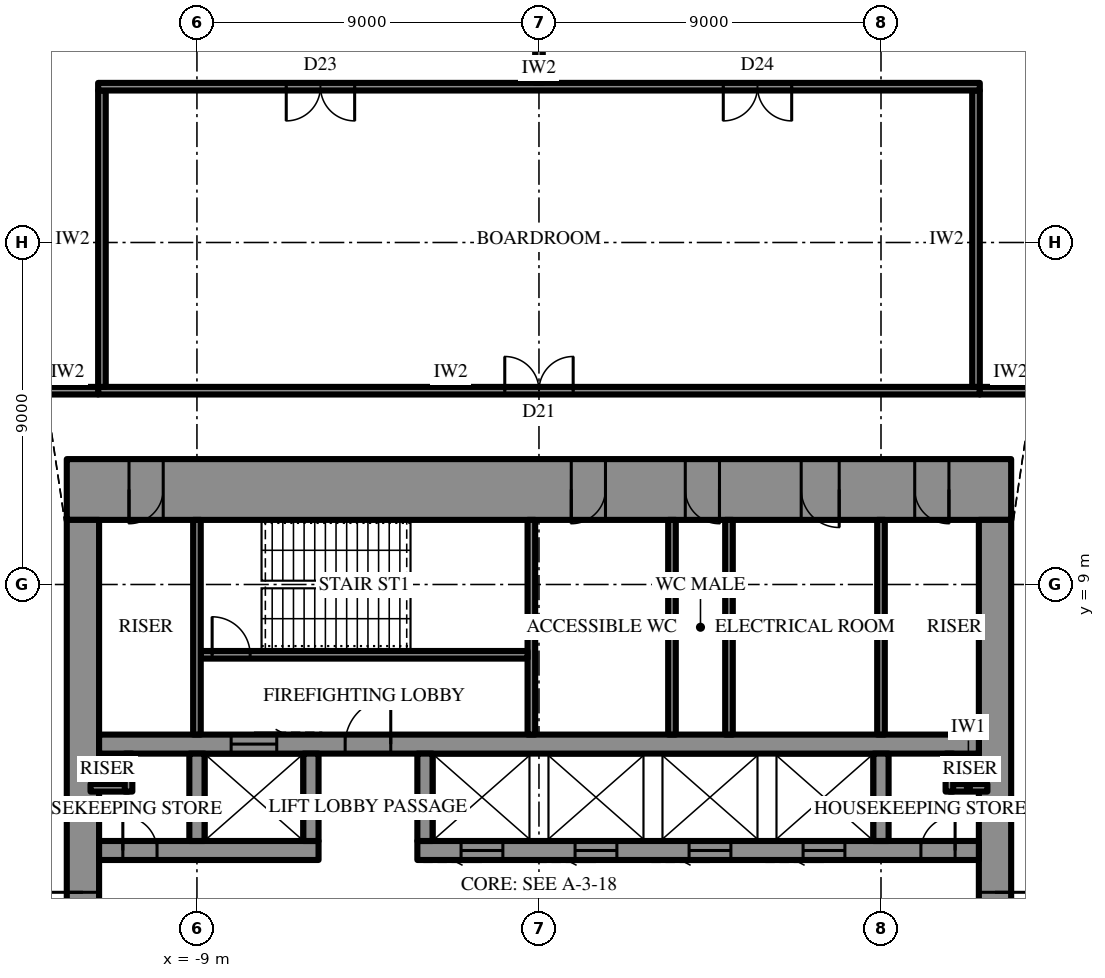
"""IFC4 building model, lengths in metres.
Left out: names, types, materials, properties, quantities, classifications, styles, units other than length and angle.
Written with IfcOpenShell. Run it as: python <this file> out.ifc"""

import sys

from ifc_helpers import new_model, si_unit, direction, frame, frame_2d, origin, place, context, subcontext, project, spatial, rectangle, extrude, element, fill, save


model = new_model("IFC4")
c1 = context("Model", 3, precision=1e-05, world=origin(), true_north=direction((0.0, 1.0)))
c2 = subcontext(c1, "Body", "Model", "MODEL_VIEW")
j1 = project(units=[si_unit("LENGTHUNIT", "METRE"), si_unit("PLANEANGLEUNIT", "RADIAN")], contexts=[c1])
p1 = place(None, origin())
s1 = spatial("IfcSite", under=j1, at=p1, CompositionType="ELEMENT")
p2 = place(p1, origin())
s2 = spatial("IfcBuilding", under=s1, at=p2, CompositionType="ELEMENT")
p3 = place(p2, frame((0.0, 0.0, 391.3)))
s3 = spatial("IfcBuildingStorey", under=s2, at=p3, CompositionType="ELEMENT", Elevation=391.3)
p4 = place(p3, frame((-12.425, 11.5, 0.0), z_axis=(0.0, 0.0, 1.0), x_axis=(1.0, 0.0, 0.0)))
e1 = element("IfcWall", 1, at=p4, inside=s3, PredefinedType="SHEAR", context=c2, shape_type="SweptSolid", body=[
    extrude(rectangle(XDim=24.85, YDim=1.6, at=frame_2d((12.425, 0.0))), origin(), (0.0, 0.0, 1.0), 5.0),
])
p5 = place(p4, frame((13.275, 0.0, 0.0)))
e2 = element("IfcOpeningElement", 2, at=p5, cuts=e1, PredefinedType="OPENING", context=c2, shape_type="SweptSolid", body=[
    extrude(rectangle(XDim=0.9, YDim=2.2, at=frame_2d((0.45, 1.1))), frame((0.0, 0.81, 0.0), z_axis=(0.0, -1.0, 0.0), x_axis=(1.0, 0.0, 0.0)), (0.0, 0.0, 1.0), 1.62),
])
p6 = place(p4, frame((16.275, 0.0, 0.0)))
e3 = element("IfcOpeningElement", 3, at=p6, cuts=e1, PredefinedType="OPENING", context=c2, shape_type="SweptSolid", body=[
    extrude(rectangle(XDim=0.9, YDim=2.2, at=frame_2d((0.45, 1.1))), frame((0.0, 0.81, 0.0), z_axis=(0.0, -1.0, 0.0), x_axis=(1.0, 0.0, 0.0)), (0.0, 0.0, 1.0), 1.62),
])
p7 = place(p4, frame((19.325, 0.0, 0.0)))
e4 = element("IfcOpeningElement", 4, at=p7, cuts=e1, PredefinedType="OPENING", context=c2, shape_type="SweptSolid", body=[
    extrude(rectangle(XDim=1.0, YDim=2.2, at=frame_2d((0.5, 1.1))), frame((0.0, 0.81, 0.0), z_axis=(0.0, -1.0, 0.0), x_axis=(1.0, 0.0, 0.0)), (0.0, 0.0, 1.0), 1.62),
])
p8 = place(p4, frame((1.637, 0.0, 0.0)))
e5 = element("IfcOpeningElement", 5, at=p8, cuts=e1, PredefinedType="OPENING", context=c2, shape_type="SweptSolid", body=[
    extrude(rectangle(XDim=0.9, YDim=2.2, at=frame_2d((0.45, 1.1))), frame((0.0, 0.81, 0.0), z_axis=(0.0, -1.0, 0.0), x_axis=(1.0, 0.0, 0.0)), (0.0, 0.0, 1.0), 1.62),
])
p9 = place(p4, frame((22.312, 0.0, 0.0)))
e6 = element("IfcOpeningElement", 6, at=p9, cuts=e1, PredefinedType="OPENING", context=c2, shape_type="SweptSolid", body=[
    extrude(rectangle(XDim=0.9, YDim=2.2, at=frame_2d((0.45, 1.1))), frame((0.0, 0.81, 0.0), z_axis=(0.0, -1.0, 0.0), x_axis=(1.0, 0.0, 0.0)), (0.0, 0.0, 1.0), 1.62),
])
p10 = place(p3, frame((12.0, -10.7, 0.0), z_axis=(0.0, 0.0, 1.0), x_axis=(0.0, 1.0, 0.0)))
e7 = element("IfcWall", 7, at=p10, inside=s3, PredefinedType="SHEAR", context=c2, shape_type="SweptSolid", body=[
    extrude(rectangle(XDim=21.4, YDim=0.85, at=frame_2d((10.7, 0.0))), origin(), (0.0, 0.0, 1.0), 5.0),
])
p11 = place(p10, frame((9.8, 0.0, 0.0)))
e8 = element("IfcOpeningElement", 8, at=p11, cuts=e7, PredefinedType="OPENING", context=c2, shape_type="SweptSolid", body=[
    extrude(rectangle(XDim=1.8, YDim=2.4, at=frame_2d((0.9, 1.2))), frame((0.0, 0.435, 0.0), z_axis=(0.0, -1.0, 0.0), x_axis=(1.0, 0.0, 0.0)), (0.0, 0.0, 1.0), 0.87),
])
p12 = place(p3, frame((-12.0, 10.7, 0.0), z_axis=(0.0, 0.0, 1.0), x_axis=(0.0, -1.0, 0.0)))
e9 = element("IfcWall", 9, at=p12, inside=s3, PredefinedType="SHEAR", context=c2, shape_type="SweptSolid", body=[
    extrude(rectangle(XDim=21.4, YDim=0.85, at=frame_2d((10.7, 0.0))), origin(), (0.0, 0.0, 1.0), 5.0),
])
p13 = place(p12, frame((9.8, 0.0, 0.0)))
e10 = element("IfcOpeningElement", 10, at=p13, cuts=e9, PredefinedType="OPENING", context=c2, shape_type="SweptSolid", body=[
    extrude(rectangle(XDim=1.8, YDim=2.4, at=frame_2d((0.9, 1.2))), frame((0.0, 0.435, 0.0), z_axis=(0.0, -1.0, 0.0), x_axis=(1.0, 0.0, 0.0)), (0.0, 0.0, 1.0), 0.87),
])
p14 = place(p3, frame((-11.575, 2.0, 0.0), z_axis=(0.0, 0.0, 1.0), x_axis=(1.0, 0.0, 0.0)))
e11 = element("IfcWall", 11, at=p14, inside=s3, PredefinedType="SHEAR", context=c2, shape_type="SweptSolid", body=[
    extrude(rectangle(XDim=5.775, YDim=0.5, at=frame_2d((2.887, 0.0))), origin(), (0.0, 0.0, 1.0), 5.0),
])
p15 = place(p14, frame((0.625, 0.0, 0.0)))
e12 = element("IfcOpeningElement", 12, at=p15, cuts=e11, PredefinedType="OPENING", context=c2, shape_type="SweptSolid", body=[
    extrude(rectangle(XDim=0.9, YDim=2.2, at=frame_2d((0.45, 1.1))), frame((0.0, 0.26, 0.0), z_axis=(0.0, -1.0, 0.0), x_axis=(1.0, 0.0, 0.0)), (0.0, 0.0, 1.0), 0.52),
])
p16 = place(p3, frame((-3.2, 2.0, 0.0), z_axis=(0.0, 0.0, 1.0), x_axis=(1.0, 0.0, 0.0)))
e13 = element("IfcWall", 13, at=p16, inside=s3, PredefinedType="SHEAR", context=c2, shape_type="SweptSolid", body=[
    extrude(rectangle(XDim=14.775, YDim=0.5, at=frame_2d((7.387, 0.0))), origin(), (0.0, 0.0, 1.0), 5.0),
])
p17 = place(p16, frame((13.25, 0.0, 0.0)))
e14 = element("IfcOpeningElement", 14, at=p17, cuts=e13, PredefinedType="OPENING", context=c2, shape_type="SweptSolid", body=[
    extrude(rectangle(XDim=0.9, YDim=2.2, at=frame_2d((0.45, 1.1))), frame((0.0, 0.26, 0.0), z_axis=(0.0, -1.0, 0.0), x_axis=(1.0, 0.0, 0.0)), (0.0, 0.0, 1.0), 0.52),
])
p18 = place(p16, frame((1.15, 0.0, 0.0)))
e15 = element("IfcOpeningElement", 15, at=p18, cuts=e13, PredefinedType="OPENING", context=c2, shape_type="SweptSolid", body=[
    extrude(rectangle(XDim=1.1, YDim=2.2, at=frame_2d((0.55, 1.1))), frame((0.0, 0.26, 0.0), z_axis=(0.0, -1.0, 0.0), x_axis=(1.0, 0.0, 0.0)), (0.0, 0.0, 1.0), 0.52),
])
p19 = place(p16, frame((4.15, 0.0, 0.0)))
e16 = element("IfcOpeningElement", 16, at=p19, cuts=e13, PredefinedType="OPENING", context=c2, shape_type="SweptSolid", body=[
    extrude(rectangle(XDim=1.1, YDim=2.2, at=frame_2d((0.55, 1.1))), frame((0.0, 0.26, 0.0), z_axis=(0.0, -1.0, 0.0), x_axis=(1.0, 0.0, 0.0)), (0.0, 0.0, 1.0), 0.52),
])
p20 = place(p16, frame((7.15, 0.0, 0.0)))
e17 = element("IfcOpeningElement", 17, at=p20, cuts=e13, PredefinedType="OPENING", context=c2, shape_type="SweptSolid", body=[
    extrude(rectangle(XDim=1.1, YDim=2.2, at=frame_2d((0.55, 1.1))), frame((0.0, 0.26, 0.0), z_axis=(0.0, -1.0, 0.0), x_axis=(1.0, 0.0, 0.0)), (0.0, 0.0, 1.0), 0.52),
])
p21 = place(p16, frame((10.15, 0.0, 0.0)))
e18 = element("IfcOpeningElement", 18, at=p21, cuts=e13, PredefinedType="OPENING", context=c2, shape_type="SweptSolid", body=[
    extrude(rectangle(XDim=1.1, YDim=2.2, at=frame_2d((0.55, 1.1))), frame((0.0, 0.26, 0.0), z_axis=(0.0, -1.0, 0.0), x_axis=(1.0, 0.0, 0.0)), (0.0, 0.0, 1.0), 0.52),
])
p22 = place(p3, frame((-11.575, 4.8, 0.0), z_axis=(0.0, 0.0, 1.0), x_axis=(1.0, 0.0, 0.0)))
e19 = element("IfcWall", 19, at=p22, inside=s3, PredefinedType="SHEAR", context=c2, shape_type="SweptSolid", body=[
    extrude(rectangle(XDim=23.15, YDim=0.5, at=frame_2d((11.575, 0.0))), origin(), (0.0, 0.0, 1.0), 5.0),
])
p23 = place(p22, frame((6.475, 0.0, 0.0)))
e20 = element("IfcOpeningElement", 20, at=p23, cuts=e19, PredefinedType="OPENING", context=c2, shape_type="SweptSolid", body=[
    extrude(rectangle(XDim=1.2, YDim=2.2, at=frame_2d((0.6, 1.1))), frame((0.0, 0.26, 0.0), z_axis=(0.0, -1.0, 0.0), x_axis=(1.0, 0.0, 0.0)), (0.0, 0.0, 1.0), 0.52),
])
p24 = place(p22, frame((3.475, 0.0, 0.0)))
e21 = element("IfcOpeningElement", 21, at=p24, cuts=e19, PredefinedType="OPENING", context=c2, shape_type="SweptSolid", body=[
    extrude(rectangle(XDim=1.2, YDim=2.2, at=frame_2d((0.6, 1.1))), frame((0.0, 0.26, 0.0), z_axis=(0.0, -1.0, 0.0), x_axis=(1.0, 0.0, 0.0)), (0.0, 0.0, 1.0), 0.52),
])
for number, where, z_axis, x_axis in (
    (22, (-9.0, 2.25, 0.0), (0.0, 0.0, 1.0), (0.0, 1.0, 0.0)),
    (23, (-6.0, 2.25, 0.0), (0.0, 0.0, 1.0), (0.0, 1.0, 0.0)),
    (24, (-3.0, 2.25, 0.0), (0.0, 0.0, 1.0), (0.0, 1.0, 0.0)),
    (25, (9.0, 2.25, 0.0), (0.0, 0.0, 1.0), (0.0, 1.0, 0.0)),
):
    element("IfcWall", number, at=place(p3, frame(where, z_axis=z_axis, x_axis=x_axis)), inside=s3, PredefinedType="SHEAR", context=c2, shape_type="SweptSolid", body=[
        extrude(rectangle(XDim=2.3, YDim=0.4, at=frame_2d((1.15, 0.0))), origin(), (0.0, 0.0, 1.0), 5.0),
    ])
p25 = place(p3, frame((-0.2, 5.05, 0.0), z_axis=(0.0, 0.0, 1.0), x_axis=(0.0, 1.0, 0.0)))
e26 = element("IfcWall", 26, at=p25, inside=s3, PredefinedType="SHEAR", context=c2, shape_type="SweptSolid", body=[
    extrude(rectangle(XDim=5.65, YDim=0.2, at=frame_2d((2.825, 0.0))), origin(), (0.0, 0.0, 1.0), 5.0),
])
p26 = place(p3, frame((-8.9, 7.15, 0.0), z_axis=(0.0, 0.0, 1.0), x_axis=(1.0, 0.0, 0.0)))
e27 = element("IfcWall", 27, at=p26, inside=s3, PredefinedType="SHEAR", context=c2, shape_type="SweptSolid", body=[
    extrude(rectangle(XDim=8.6, YDim=0.2, at=frame_2d((4.3, 0.0))), origin(), (0.0, 0.0, 1.0), 5.0),
])
p27 = place(p26, frame((0.3, 0.0, 0.0)))
e28 = element("IfcOpeningElement", 28, at=p27, cuts=e27, PredefinedType="OPENING", context=c2, shape_type="SweptSolid", body=[
    extrude(rectangle(XDim=1.0, YDim=2.2, at=frame_2d((0.5, 1.1))), frame((0.0, 0.11, 0.0), z_axis=(0.0, -1.0, 0.0), x_axis=(1.0, 0.0, 0.0)), (0.0, 0.0, 1.0), 0.22),
])
for number, where, z_axis, x_axis in (
    (29, (-9.0, 5.05, 0.0), (0.0, 0.0, 1.0), (0.0, 1.0, 0.0)),
    (30, (9.0, 5.05, 0.0), (0.0, 0.0, 1.0), (0.0, 1.0, 0.0)),
    (31, (3.5, 5.05, 0.0), (0.0, 0.0, 1.0), (0.0, 1.0, 0.0)),
    (32, (5.0, 5.05, 0.0), (0.0, 0.0, 1.0), (0.0, 1.0, 0.0)),
):
    element("IfcWall", number, at=place(p3, frame(where, z_axis=z_axis, x_axis=x_axis)), inside=s3, PredefinedType="PARTITIONING", context=c2, shape_type="SweptSolid", body=[
        extrude(rectangle(XDim=5.65, YDim=0.2, at=frame_2d((2.825, 0.0))), origin(), (0.0, 0.0, 1.0), 4.7),
    ])
for number, where, z_axis, x_axis in (
    (33, (-11.8, 3.65, 0.0), (0.0, 0.0, 1.0), (1.0, 0.0, 0.0)),
    (34, (-10.8, 3.55, 0.0), (0.0, 0.0, 1.0), (0.0, 1.0, 0.0)),
    (35, (10.8, 3.65, 0.0), (0.0, 0.0, 1.0), (1.0, 0.0, 0.0)),
    (36, (10.8, 3.55, 0.0), (0.0, 0.0, 1.0), (0.0, 1.0, 0.0)),
):
    element("IfcWall", number, at=place(p3, frame(where, z_axis=z_axis, x_axis=x_axis)), inside=s3, PredefinedType="PARTITIONING", context=c2, shape_type="SweptSolid", body=[
        extrude(rectangle(XDim=1.0, YDim=0.2, at=frame_2d((0.5, 0.0))), origin(), (0.0, 0.0, 1.0), 4.7),
    ])
p28 = place(p3, frame((-11.6, 14.1, 0.0), z_axis=(0.0, 0.0, 1.0), x_axis=(1.0, 0.0, 0.0)))
e37 = element("IfcWall", 37, at=p28, inside=s3, PredefinedType="PARTITIONING", context=c2, shape_type="SweptSolid", body=[
    extrude(rectangle(XDim=23.2, YDim=0.2, at=frame_2d((11.6, 0.0))), origin(), (0.0, 0.0, 1.0), 4.7),
])
p29 = place(p28, frame((10.7, 0.0, 0.0)))
e38 = element("IfcOpeningElement", 38, at=p29, cuts=e37, PredefinedType="OPENING", context=c2, shape_type="SweptSolid", body=[
    extrude(rectangle(XDim=1.8, YDim=2.4, at=frame_2d((0.9, 1.2))), frame((0.0, 0.11, 0.0), z_axis=(0.0, -1.0, 0.0), x_axis=(1.0, 0.0, 0.0)), (0.0, 0.0, 1.0), 0.22),
])
for number, where, z_axis, x_axis in (
    (39, (-11.5, 14.2, 0.0), (0.0, 0.0, 1.0), (0.0, 1.0, 0.0)),
    (40, (11.5, 14.2, 0.0), (0.0, 0.0, 1.0), (0.0, 1.0, 0.0)),
):
    element("IfcWall", number, at=place(p3, frame(where, z_axis=z_axis, x_axis=x_axis)), inside=s3, PredefinedType="PARTITIONING", context=c2, shape_type="SweptSolid", body=[
        extrude(rectangle(XDim=7.8, YDim=0.2, at=frame_2d((3.9, 0.0))), origin(), (0.0, 0.0, 1.0), 4.7),
    ])
p30 = place(p3, frame((-11.6, 22.1, 0.0), z_axis=(0.0, 0.0, 1.0), x_axis=(1.0, 0.0, 0.0)))
e41 = element("IfcWall", 41, at=p30, inside=s3, PredefinedType="PARTITIONING", context=c2, shape_type="SweptSolid", body=[
    extrude(rectangle(XDim=23.2, YDim=0.2, at=frame_2d((11.6, 0.0))), origin(), (0.0, 0.0, 1.0), 4.7),
])
p31 = place(p30, frame((4.95, 0.0, 0.0)))
e42 = element("IfcOpeningElement", 42, at=p31, cuts=e41, PredefinedType="OPENING", context=c2, shape_type="SweptSolid", body=[
    extrude(rectangle(XDim=1.8, YDim=2.4, at=frame_2d((0.9, 1.2))), frame((0.0, 0.11, 0.0), z_axis=(0.0, -1.0, 0.0), x_axis=(1.0, 0.0, 0.0)), (0.0, 0.0, 1.0), 0.22),
])
p32 = place(p30, frame((16.45, 0.0, 0.0)))
e43 = element("IfcOpeningElement", 43, at=p32, cuts=e41, PredefinedType="OPENING", context=c2, shape_type="SweptSolid", body=[
    extrude(rectangle(XDim=1.8, YDim=2.4, at=frame_2d((0.9, 1.2))), frame((0.0, 0.11, 0.0), z_axis=(0.0, -1.0, 0.0), x_axis=(1.0, 0.0, 0.0)), (0.0, 0.0, 1.0), 0.22),
])
for number, where, z_axis, x_axis in (
    (44, (-13.225, 14.1, 0.0), (0.0, 0.0, 1.0), (1.0, 0.0, 0.0)),
    (45, (11.6, 14.1, 0.0), (0.0, 0.0, 1.0), (1.0, 0.0, 0.0)),
):
    element("IfcWall", number, at=place(p3, frame(where, z_axis=z_axis, x_axis=x_axis)), inside=s3, PredefinedType="PARTITIONING", context=c2, shape_type="SweptSolid", body=[
        extrude(rectangle(XDim=1.625, YDim=0.2, at=frame_2d((0.812, 0.0))), origin(), (0.0, 0.0, 1.0), 4.7),
    ])
p33 = place(p3, frame((0.0, 22.2, 0.0), z_axis=(0.0, 0.0, 1.0), x_axis=(0.0, 1.0, 0.0)))
e46 = element("IfcWall", 46, at=p33, inside=s3, PredefinedType="PARTITIONING", context=c2, shape_type="SweptSolid", body=[
    extrude(rectangle(XDim=4.36, YDim=0.2, at=frame_2d((2.18, 0.0))), origin(), (0.0, 0.0, 1.0), 3.692),
])
p34 = place(p11, frame((1.8, 0.0, 0.0), z_axis=(0.0, 0.0, 1.0), x_axis=(-1.0, 0.0, 0.0)))
e47 = element("IfcDoor", 47, at=p34, inside=s3, OperationType="DOUBLE_DOOR_SINGLE_SWING", PredefinedType="DOOR", context=c2, shape_type="SweptSolid", body=[
    extrude(rectangle(XDim=1.8, YDim=2.4, at=frame_2d((0.9, 1.2))), frame((0.0, 0.025, 0.0), z_axis=(0.0, -1.0, 0.0), x_axis=(1.0, 0.0, 0.0)), (0.0, 0.0, 1.0), 0.05),
])
fill(e8, e47)
p35 = place(p13, frame((1.8, 0.0, 0.0), z_axis=(0.0, 0.0, 1.0), x_axis=(-1.0, 0.0, 0.0)))
e48 = element("IfcDoor", 48, at=p35, inside=s3, OperationType="DOUBLE_DOOR_SINGLE_SWING", PredefinedType="DOOR", context=c2, shape_type="SweptSolid", body=[
    extrude(rectangle(XDim=1.8, YDim=2.4, at=frame_2d((0.9, 1.2))), frame((0.0, 0.025, 0.0), z_axis=(0.0, -1.0, 0.0), x_axis=(1.0, 0.0, 0.0)), (0.0, 0.0, 1.0), 0.05),
])
fill(e10, e48)
p36 = place(p23, origin())
e49 = element("IfcDoor", 49, at=p36, inside=s3, OperationType="SINGLE_SWING_LEFT", PredefinedType="DOOR", context=c2, shape_type="SweptSolid", body=[
    extrude(rectangle(XDim=1.2, YDim=2.2, at=frame_2d((0.6, 1.1))), frame((0.0, 0.025, 0.0), z_axis=(0.0, -1.0, 0.0), x_axis=(1.0, 0.0, 0.0)), (0.0, 0.0, 1.0), 0.05),
])
fill(e20, e49)
p37 = place(p27, origin())
e50 = element("IfcDoor", 50, at=p37, inside=s3, OperationType="SINGLE_SWING_RIGHT", PredefinedType="DOOR", context=c2, shape_type="SweptSolid", body=[
    extrude(rectangle(XDim=1.0, YDim=2.2, at=frame_2d((0.5, 1.1))), frame((0.0, 0.025, 0.0), z_axis=(0.0, -1.0, 0.0), x_axis=(1.0, 0.0, 0.0)), (0.0, 0.0, 1.0), 0.05),
])
fill(e28, e50)
p38 = place(p5, frame((0.9, 0.0, 0.0), z_axis=(0.0, 0.0, 1.0), x_axis=(-1.0, 0.0, 0.0)))
e51 = element("IfcDoor", 51, at=p38, inside=s3, OperationType="SINGLE_SWING_LEFT", PredefinedType="DOOR", context=c2, shape_type="SweptSolid", body=[
    extrude(rectangle(XDim=0.9, YDim=2.2, at=frame_2d((0.45, 1.1))), frame((0.0, 0.025, 0.0), z_axis=(0.0, -1.0, 0.0), x_axis=(1.0, 0.0, 0.0)), (0.0, 0.0, 1.0), 0.05),
])
fill(e2, e51)
p39 = place(p6, frame((0.9, 0.0, 0.0), z_axis=(0.0, 0.0, 1.0), x_axis=(-1.0, 0.0, 0.0)))
e52 = element("IfcDoor", 52, at=p39, inside=s3, OperationType="SINGLE_SWING_RIGHT", PredefinedType="DOOR", context=c2, shape_type="SweptSolid", body=[
    extrude(rectangle(XDim=0.9, YDim=2.2, at=frame_2d((0.45, 1.1))), frame((0.0, 0.025, 0.0), z_axis=(0.0, -1.0, 0.0), x_axis=(1.0, 0.0, 0.0)), (0.0, 0.0, 1.0), 0.05),
])
fill(e3, e52)
p40 = place(p7, frame((1.0, 0.0, 0.0), z_axis=(0.0, 0.0, 1.0), x_axis=(-1.0, 0.0, 0.0)))
e53 = element("IfcDoor", 53, at=p40, inside=s3, OperationType="SINGLE_SWING_RIGHT", PredefinedType="DOOR", context=c2, shape_type="SweptSolid", body=[
    extrude(rectangle(XDim=1.0, YDim=2.2, at=frame_2d((0.5, 1.1))), frame((0.0, 0.025, 0.0), z_axis=(0.0, -1.0, 0.0), x_axis=(1.0, 0.0, 0.0)), (0.0, 0.0, 1.0), 0.05),
])
fill(e4, e53)
p41 = place(p8, frame((0.9, 0.0, 0.0), z_axis=(0.0, 0.0, 1.0), x_axis=(-1.0, 0.0, 0.0)))
e54 = element("IfcDoor", 54, at=p41, inside=s3, OperationType="SINGLE_SWING_LEFT", PredefinedType="DOOR", context=c2, shape_type="SweptSolid", body=[
    extrude(rectangle(XDim=0.9, YDim=2.2, at=frame_2d((0.45, 1.1))), frame((0.0, 0.025, 0.0), z_axis=(0.0, -1.0, 0.0), x_axis=(1.0, 0.0, 0.0)), (0.0, 0.0, 1.0), 0.05),
])
fill(e5, e54)
p42 = place(p9, frame((0.9, 0.0, 0.0), z_axis=(0.0, 0.0, 1.0), x_axis=(-1.0, 0.0, 0.0)))
e55 = element("IfcDoor", 55, at=p42, inside=s3, OperationType="SINGLE_SWING_RIGHT", PredefinedType="DOOR", context=c2, shape_type="SweptSolid", body=[
    extrude(rectangle(XDim=0.9, YDim=2.2, at=frame_2d((0.45, 1.1))), frame((0.0, 0.025, 0.0), z_axis=(0.0, -1.0, 0.0), x_axis=(1.0, 0.0, 0.0)), (0.0, 0.0, 1.0), 0.05),
])
fill(e6, e55)
p43 = place(p15, origin())
e56 = element("IfcDoor", 56, at=p43, inside=s3, OperationType="SINGLE_SWING_RIGHT", PredefinedType="DOOR", context=c2, shape_type="SweptSolid", body=[
    extrude(rectangle(XDim=0.9, YDim=2.2, at=frame_2d((0.45, 1.1))), frame((0.0, 0.025, 0.0), z_axis=(0.0, -1.0, 0.0), x_axis=(1.0, 0.0, 0.0)), (0.0, 0.0, 1.0), 0.05),
])
fill(e12, e56)
p44 = place(p17, origin())
e57 = element("IfcDoor", 57, at=p44, inside=s3, OperationType="SINGLE_SWING_LEFT", PredefinedType="DOOR", context=c2, shape_type="SweptSolid", body=[
    extrude(rectangle(XDim=0.9, YDim=2.2, at=frame_2d((0.45, 1.1))), frame((0.0, 0.025, 0.0), z_axis=(0.0, -1.0, 0.0), x_axis=(1.0, 0.0, 0.0)), (0.0, 0.0, 1.0), 0.05),
])
fill(e14, e57)
p45 = place(p24, origin())
e58 = element("IfcDoor", 58, at=p45, inside=s3, OperationType="SLIDING_TO_LEFT", PredefinedType="DOOR", context=c2, shape_type="SweptSolid", body=[
    extrude(rectangle(XDim=1.2, YDim=2.2, at=frame_2d((0.6, 1.1))), frame((0.0, 0.025, 0.0), z_axis=(0.0, -1.0, 0.0), x_axis=(1.0, 0.0, 0.0)), (0.0, 0.0, 1.0), 0.05),
])
fill(e21, e58)
p46 = place(p18, frame((1.1, 0.0, 0.0), z_axis=(0.0, 0.0, 1.0), x_axis=(-1.0, 0.0, 0.0)))
e59 = element("IfcDoor", 59, at=p46, inside=s3, OperationType="SLIDING_TO_LEFT", PredefinedType="DOOR", context=c2, shape_type="SweptSolid", body=[
    extrude(rectangle(XDim=1.1, YDim=2.2, at=frame_2d((0.55, 1.1))), frame((0.0, 0.025, 0.0), z_axis=(0.0, -1.0, 0.0), x_axis=(1.0, 0.0, 0.0)), (0.0, 0.0, 1.0), 0.05),
])
fill(e15, e59)
p47 = place(p19, frame((1.1, 0.0, 0.0), z_axis=(0.0, 0.0, 1.0), x_axis=(-1.0, 0.0, 0.0)))
e60 = element("IfcDoor", 60, at=p47, inside=s3, OperationType="SLIDING_TO_LEFT", PredefinedType="DOOR", context=c2, shape_type="SweptSolid", body=[
    extrude(rectangle(XDim=1.1, YDim=2.2, at=frame_2d((0.55, 1.1))), frame((0.0, 0.025, 0.0), z_axis=(0.0, -1.0, 0.0), x_axis=(1.0, 0.0, 0.0)), (0.0, 0.0, 1.0), 0.05),
])
fill(e16, e60)
p48 = place(p20, frame((1.1, 0.0, 0.0), z_axis=(0.0, 0.0, 1.0), x_axis=(-1.0, 0.0, 0.0)))
e61 = element("IfcDoor", 61, at=p48, inside=s3, OperationType="SLIDING_TO_LEFT", PredefinedType="DOOR", context=c2, shape_type="SweptSolid", body=[
    extrude(rectangle(XDim=1.1, YDim=2.2, at=frame_2d((0.55, 1.1))), frame((0.0, 0.025, 0.0), z_axis=(0.0, -1.0, 0.0), x_axis=(1.0, 0.0, 0.0)), (0.0, 0.0, 1.0), 0.05),
])
fill(e17, e61)
p49 = place(p21, frame((1.1, 0.0, 0.0), z_axis=(0.0, 0.0, 1.0), x_axis=(-1.0, 0.0, 0.0)))
e62 = element("IfcDoor", 62, at=p49, inside=s3, OperationType="SLIDING_TO_LEFT", PredefinedType="DOOR", context=c2, shape_type="SweptSolid", body=[
    extrude(rectangle(XDim=1.1, YDim=2.2, at=frame_2d((0.55, 1.1))), frame((0.0, 0.025, 0.0), z_axis=(0.0, -1.0, 0.0), x_axis=(1.0, 0.0, 0.0)), (0.0, 0.0, 1.0), 0.05),
])
fill(e18, e62)
p50 = place(p31, frame((1.8, 0.0, 0.0), z_axis=(0.0, 0.0, 1.0), x_axis=(-1.0, 0.0, 0.0)))
e63 = element("IfcDoor", 63, at=p50, inside=s3, OperationType="DOUBLE_DOOR_SINGLE_SWING", PredefinedType="DOOR", context=c2, shape_type="SweptSolid", body=[
    extrude(rectangle(XDim=1.8, YDim=2.4, at=frame_2d((0.9, 1.2))), frame((0.0, 0.025, 0.0), z_axis=(0.0, -1.0, 0.0), x_axis=(1.0, 0.0, 0.0)), (0.0, 0.0, 1.0), 0.05),
])
fill(e42, e63)
p51 = place(p32, frame((1.8, 0.0, 0.0), z_axis=(0.0, 0.0, 1.0), x_axis=(-1.0, 0.0, 0.0)))
e64 = element("IfcDoor", 64, at=p51, inside=s3, OperationType="DOUBLE_DOOR_SINGLE_SWING", PredefinedType="DOOR", context=c2, shape_type="SweptSolid", body=[
    extrude(rectangle(XDim=1.8, YDim=2.4, at=frame_2d((0.9, 1.2))), frame((0.0, 0.025, 0.0), z_axis=(0.0, -1.0, 0.0), x_axis=(1.0, 0.0, 0.0)), (0.0, 0.0, 1.0), 0.05),
])
fill(e43, e64)
p52 = place(p29, origin())
e65 = element("IfcDoor", 65, at=p52, inside=s3, OperationType="DOUBLE_DOOR_SINGLE_SWING", PredefinedType="DOOR", context=c2, shape_type="SweptSolid", body=[
    extrude(rectangle(XDim=1.8, YDim=2.4, at=frame_2d((0.9, 1.2))), frame((0.0, 0.025, 0.0), z_axis=(0.0, -1.0, 0.0), x_axis=(1.0, 0.0, 0.0)), (0.0, 0.0, 1.0), 0.05),
])
fill(e38, e65)
save(model, sys.argv[1])
